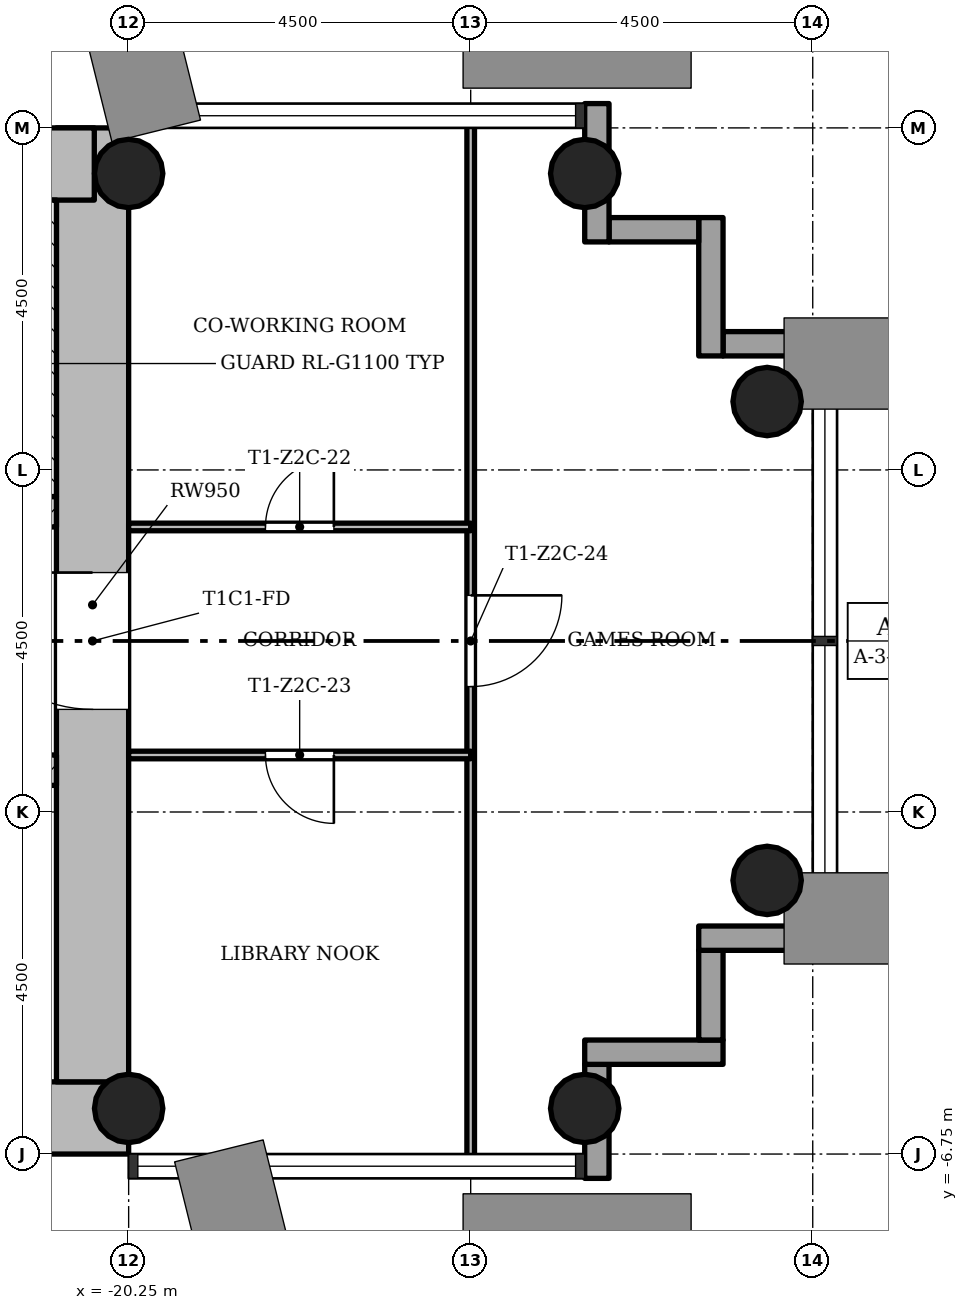
"""IFC4 building model, lengths in metres.
Left out: names, types, materials, properties, quantities, classifications, styles, units other than length and angle.
Written with IfcOpenShell. Run it as: python <this file> out.ifc"""

import sys

from ifc_helpers import new_model, si_unit, direction, frame, frame_2d, origin, origin_2d, place, context, subcontext, project, spatial, rectangle, hollow_circle, extrude, element, fill, save


model = new_model("IFC4")
c1 = context("Model", 3, precision=1e-05, world=origin(), true_north=direction((0.0, 1.0)))
c2 = subcontext(c1, "Body", "Model", "MODEL_VIEW")
j1 = project(units=[si_unit("LENGTHUNIT", "METRE"), si_unit("PLANEANGLEUNIT", "RADIAN")], contexts=[c1])
p1 = place(None, origin())
s1 = spatial("IfcSite", under=j1, at=p1, CompositionType="ELEMENT")
p2 = place(p1, origin())
s2 = spatial("IfcBuilding", under=s1, at=p2, CompositionType="ELEMENT")
p3 = place(p2, frame((0.0, 0.0, 93.6)))
s3 = spatial("IfcBuildingStorey", under=s2, at=p3, CompositionType="ELEMENT", Elevation=93.6)
p4 = place(p3, frame((-28.3, -6.275, 0.0), z_axis=(0.0, 0.0, 1.0), x_axis=(1.0, 0.0, 0.0)))
e1 = element("IfcWall", 1, at=p4, inside=s3, PredefinedType="SHEAR", context=c2, shape_type="SweptSolid", body=[
    extrude(rectangle(XDim=8.05, YDim=0.95, at=frame_2d((4.025, 0.0))), origin(), (0.0, 0.0, 1.0), 3.4),
])
p5 = place(p3, frame((-20.725, -5.8, 0.0), z_axis=(0.0, 0.0, 1.0), x_axis=(0.0, 1.0, 0.0)))
e2 = element("IfcWall", 2, at=p5, inside=s3, PredefinedType="SHEAR", context=c2, shape_type="SweptSolid", body=[
    extrude(rectangle(XDim=12.55, YDim=0.95, at=frame_2d((6.275, 0.0))), origin(), (0.0, 0.0, 1.0), 3.4),
])
p6 = place(p5, frame((4.9, 0.0, 0.0)))
e3 = element("IfcOpeningElement", 3, at=p6, cuts=e2, PredefinedType="OPENING", context=c2, shape_type="SweptSolid", body=[
    extrude(rectangle(XDim=1.8, YDim=2.1, at=frame_2d((0.9, 1.05))), frame((0.0, 0.485, 0.0), z_axis=(0.0, -1.0, 0.0), x_axis=(1.0, 0.0, 0.0)), (0.0, 0.0, 1.0), 0.97),
])
p7 = place(p3, frame((-20.702, 6.275, 0.0), z_axis=(0.0, 0.0, 1.0), x_axis=(-1.0, 0.0, 0.0)))
e4 = element("IfcWall", 4, at=p7, inside=s3, PredefinedType="SHEAR", context=c2, shape_type="SweptSolid", body=[
    extrude(rectangle(XDim=8.696, YDim=0.95, at=frame_2d((4.348, 0.0))), origin(), (0.0, 0.0, 1.0), 3.4),
])
p8 = place(p3, frame((-28.3, -1.7, 0.0), z_axis=(0.0, 0.0, 1.0), x_axis=(1.0, 0.0, 0.0)))
e5 = element("IfcWall", 5, at=p8, inside=s3, PredefinedType="SHEAR", context=c2, shape_type="SweptSolid", body=[
    extrude(rectangle(XDim=7.1, YDim=0.4, at=frame_2d((3.55, 0.0))), origin(), (0.0, 0.0, 1.0), 3.4),
])
p9 = place(p8, frame((0.8, 0.0, 0.0)))
e6 = element("IfcOpeningElement", 6, at=p9, cuts=e5, PredefinedType="OPENING", context=c2, shape_type="SweptSolid", body=[
    extrude(rectangle(XDim=1.1, YDim=2.1, at=frame_2d((0.55, 1.05))), frame((0.0, 0.21, 0.0), z_axis=(0.0, -1.0, 0.0), x_axis=(1.0, 0.0, 0.0)), (0.0, 0.0, 1.0), 0.42),
])
p10 = place(p8, frame((3.0, 0.0, 0.0)))
e7 = element("IfcOpeningElement", 7, at=p10, cuts=e5, PredefinedType="OPENING", context=c2, shape_type="SweptSolid", body=[
    extrude(rectangle(XDim=1.1, YDim=2.1, at=frame_2d((0.55, 1.05))), frame((0.0, 0.21, 0.0), z_axis=(0.0, -1.0, 0.0), x_axis=(1.0, 0.0, 0.0)), (0.0, 0.0, 1.0), 0.42),
])
p11 = place(p8, frame((5.2, 0.0, 0.0)))
e8 = element("IfcOpeningElement", 8, at=p11, cuts=e5, PredefinedType="OPENING", context=c2, shape_type="SweptSolid", body=[
    extrude(rectangle(XDim=1.1, YDim=2.1, at=frame_2d((0.55, 1.05))), frame((0.0, 0.21, 0.0), z_axis=(0.0, -1.0, 0.0), x_axis=(1.0, 0.0, 0.0)), (0.0, 0.0, 1.0), 0.42),
])
p12 = place(p3, frame((-28.3, 1.7, 0.0), z_axis=(0.0, 0.0, 1.0), x_axis=(1.0, 0.0, 0.0)))
e9 = element("IfcWall", 9, at=p12, inside=s3, PredefinedType="SHEAR", context=c2, shape_type="SweptSolid", body=[
    extrude(rectangle(XDim=7.1, YDim=0.4, at=frame_2d((3.55, 0.0))), origin(), (0.0, 0.0, 1.0), 3.4),
])
p13 = place(p12, frame((0.7, 0.0, 0.0)))
e10 = element("IfcOpeningElement", 10, at=p13, cuts=e9, PredefinedType="OPENING", context=c2, shape_type="SweptSolid", body=[
    extrude(rectangle(XDim=0.9, YDim=2.1, at=frame_2d((0.45, 1.05))), frame((0.0, 0.21, 0.0), z_axis=(0.0, -1.0, 0.0), x_axis=(1.0, 0.0, 0.0)), (0.0, 0.0, 1.0), 0.42),
])
for number, where, z_axis, x_axis in (
    (11, (-20.25, -6.15, 0.0), (0.0, 0.0, 1.0), (1.0, 0.0, 0.0)),
    (12, (-20.25, 6.15, 0.0), (0.0, 0.0, 1.0), (1.0, 0.0, 0.0)),
    (13, (-14.25, -6.15, 0.0), (0.0, 0.0, 1.0), (1.0, 0.0, 0.0)),
    (14, (-14.25, 6.15, 0.0), (0.0, 0.0, 1.0), (1.0, 0.0, 0.0)),
    (15, (-11.85, -3.15, 0.0), (0.0, 0.0, 1.0), (1.0, 0.0, 0.0)),
    (16, (-11.85, 3.15, 0.0), (0.0, 0.0, 1.0), (1.0, 0.0, 0.0)),
):
    element("IfcColumn", number, at=place(p3, frame(where, z_axis=z_axis, x_axis=x_axis)), inside=s3, PredefinedType="COLUMN", context=c2, shape_type="SweptSolid", body=[
        extrude(hollow_circle(Radius=0.45, WallThickness=0.032, at=origin_2d()), origin(), (0.0, 0.0, 1.0), 3.4),
    ])
p14 = place(p3, frame((-14.09, -7.07, -0.3), z_axis=(0.0, 0.0, 1.0), x_axis=(0.0, 1.0, 0.0)))
e17 = element("IfcWall", 17, at=p14, inside=s3, PredefinedType="STANDARD", context=c2, shape_type="SweptSolid", body=[
    extrude(rectangle(XDim=1.5, YDim=0.32, at=frame_2d((0.75, 0.0))), origin(), (0.0, 0.0, 1.0), 3.4),
])
p15 = place(p3, frame((-14.25, -5.41, -0.3), z_axis=(0.0, 0.0, 1.0), x_axis=(1.0, 0.0, 0.0)))
e18 = element("IfcWall", 18, at=p15, inside=s3, PredefinedType="STANDARD", context=c2, shape_type="SweptSolid", body=[
    extrude(rectangle(XDim=1.82, YDim=0.32, at=frame_2d((0.91, 0.0))), origin(), (0.0, 0.0, 1.0), 3.4),
])
p16 = place(p3, frame((-12.59, -5.25, -0.3), z_axis=(0.0, 0.0, 1.0), x_axis=(0.0, 1.0, 0.0)))
e19 = element("IfcWall", 19, at=p16, inside=s3, PredefinedType="STANDARD", context=c2, shape_type="SweptSolid", body=[
    extrude(rectangle(XDim=1.18, YDim=0.32, at=frame_2d((0.59, 0.0))), origin(), (0.0, 0.0, 1.0), 3.4),
])
p17 = place(p3, frame((-12.75, -3.91, -0.3), z_axis=(0.0, 0.0, 1.0), x_axis=(1.0, 0.0, 0.0)))
e20 = element("IfcWall", 20, at=p17, inside=s3, PredefinedType="STANDARD", context=c2, shape_type="SweptSolid", body=[
    extrude(rectangle(XDim=1.82, YDim=0.32, at=frame_2d((0.91, 0.0))), origin(), (0.0, 0.0, 1.0), 3.4),
])
p18 = place(p3, frame((-10.93, 3.91, -0.3), z_axis=(0.0, 0.0, 1.0), x_axis=(-1.0, 0.0, 0.0)))
e21 = element("IfcWall", 21, at=p18, inside=s3, PredefinedType="STANDARD", context=c2, shape_type="SweptSolid", body=[
    extrude(rectangle(XDim=1.5, YDim=0.32, at=frame_2d((0.75, 0.0))), origin(), (0.0, 0.0, 1.0), 3.4),
])
p19 = place(p3, frame((-12.59, 3.75, -0.3), z_axis=(0.0, 0.0, 1.0), x_axis=(0.0, 1.0, 0.0)))
e22 = element("IfcWall", 22, at=p19, inside=s3, PredefinedType="STANDARD", context=c2, shape_type="SweptSolid", body=[
    extrude(rectangle(XDim=1.82, YDim=0.32, at=frame_2d((0.91, 0.0))), origin(), (0.0, 0.0, 1.0), 3.4),
])
p20 = place(p3, frame((-12.75, 5.41, -0.3), z_axis=(0.0, 0.0, 1.0), x_axis=(-1.0, 0.0, 0.0)))
e23 = element("IfcWall", 23, at=p20, inside=s3, PredefinedType="STANDARD", context=c2, shape_type="SweptSolid", body=[
    extrude(rectangle(XDim=1.18, YDim=0.32, at=frame_2d((0.59, 0.0))), origin(), (0.0, 0.0, 1.0), 3.4),
])
p21 = place(p3, frame((-14.09, 5.25, -0.3), z_axis=(0.0, 0.0, 1.0), x_axis=(0.0, 1.0, 0.0)))
e24 = element("IfcWall", 24, at=p21, inside=s3, PredefinedType="STANDARD", context=c2, shape_type="SweptSolid", body=[
    extrude(rectangle(XDim=1.82, YDim=0.32, at=frame_2d((0.91, 0.0))), origin(), (0.0, 0.0, 1.0), 3.4),
])
p22 = place(p3, frame((-15.75, -6.85, 0.0), z_axis=(0.0, 0.0, 1.0), x_axis=(0.0, 1.0, 0.0)))
e25 = element("IfcWall", 25, at=p22, inside=s3, PredefinedType="PARTITIONING", context=c2, shape_type="SweptSolid", body=[
    extrude(rectangle(XDim=13.7, YDim=0.1, at=frame_2d((6.85, 0.0))), origin(), (0.0, 0.0, 1.0), 3.0),
])
p23 = place(p22, frame((6.25, 0.0, 0.0)))
e26 = element("IfcOpeningElement", 26, at=p23, cuts=e25, PredefinedType="OPENING", context=c2, shape_type="SweptSolid", body=[
    extrude(rectangle(XDim=1.2, YDim=2.1, at=frame_2d((0.6, 1.05))), frame((0.0, 0.06, 0.0), z_axis=(0.0, -1.0, 0.0), x_axis=(1.0, 0.0, 0.0)), (0.0, 0.0, 1.0), 0.12),
])
p24 = place(p3, frame((-20.25, -1.5, 0.0), z_axis=(0.0, 0.0, 1.0), x_axis=(1.0, 0.0, 0.0)))
e27 = element("IfcWall", 27, at=p24, inside=s3, PredefinedType="PARTITIONING", context=c2, shape_type="SweptSolid", body=[
    extrude(rectangle(XDim=4.5, YDim=0.1, at=frame_2d((2.25, 0.0))), origin(), (0.0, 0.0, 1.0), 3.0),
])
p25 = place(p24, frame((1.8, 0.0, 0.0)))
e28 = element("IfcOpeningElement", 28, at=p25, cuts=e27, PredefinedType="OPENING", context=c2, shape_type="SweptSolid", body=[
    extrude(rectangle(XDim=0.9, YDim=2.1, at=frame_2d((0.45, 1.05))), frame((0.0, 0.06, 0.0), z_axis=(0.0, -1.0, 0.0), x_axis=(1.0, 0.0, 0.0)), (0.0, 0.0, 1.0), 0.12),
])
p26 = place(p3, frame((-20.25, 1.5, 0.0), z_axis=(0.0, 0.0, 1.0), x_axis=(1.0, 0.0, 0.0)))
e29 = element("IfcWall", 29, at=p26, inside=s3, PredefinedType="PARTITIONING", context=c2, shape_type="SweptSolid", body=[
    extrude(rectangle(XDim=4.5, YDim=0.1, at=frame_2d((2.25, 0.0))), origin(), (0.0, 0.0, 1.0), 3.0),
])
p27 = place(p26, frame((1.8, 0.0, 0.0)))
e30 = element("IfcOpeningElement", 30, at=p27, cuts=e29, PredefinedType="OPENING", context=c2, shape_type="SweptSolid", body=[
    extrude(rectangle(XDim=0.9, YDim=2.1, at=frame_2d((0.45, 1.05))), frame((0.0, 0.06, 0.0), z_axis=(0.0, -1.0, 0.0), x_axis=(1.0, 0.0, 0.0)), (0.0, 0.0, 1.0), 0.12),
])
p28 = place(p3, frame((-21.325, 1.9, 0.0), z_axis=(0.0, 0.0, 1.0), x_axis=(0.0, 1.0, 0.0)))
e31 = element("IfcWall", 31, at=p28, inside=s3, PredefinedType="SHEAR", context=c2, shape_type="SweptSolid", body=[
    extrude(rectangle(XDim=3.9, YDim=0.25, at=frame_2d((1.95, 0.0))), origin(), (0.0, 0.0, 1.0), 3.4),
])
p29 = place(p27, origin())
e32 = element("IfcDoor", 32, at=p29, inside=s3, OperationType="SINGLE_SWING_LEFT", PredefinedType="DOOR", context=c2, shape_type="SweptSolid", body=[
    extrude(rectangle(XDim=0.9, YDim=2.1, at=frame_2d((0.45, 1.05))), frame((0.0, 0.025, 0.0), z_axis=(0.0, -1.0, 0.0), x_axis=(1.0, 0.0, 0.0)), (0.0, 0.0, 1.0), 0.05),
])
fill(e30, e32)
p30 = place(p25, origin())
e33 = element("IfcDoor", 33, at=p30, inside=s3, OperationType="SINGLE_SWING_RIGHT", PredefinedType="DOOR", context=c2, shape_type="SweptSolid", body=[
    extrude(rectangle(XDim=0.9, YDim=2.1, at=frame_2d((0.45, 1.05))), frame((0.0, 0.025, 0.0), z_axis=(0.0, -1.0, 0.0), x_axis=(1.0, 0.0, 0.0)), (0.0, 0.0, 1.0), 0.05),
])
fill(e28, e33)
p31 = place(p23, origin())
e34 = element("IfcDoor", 34, at=p31, inside=s3, OperationType="SINGLE_SWING_RIGHT", PredefinedType="DOOR", context=c2, shape_type="SweptSolid", body=[
    extrude(rectangle(XDim=1.2, YDim=2.1, at=frame_2d((0.6, 1.05))), frame((0.0, 0.025, 0.0), z_axis=(0.0, -1.0, 0.0), x_axis=(1.0, 0.0, 0.0)), (0.0, 0.0, 1.0), 0.05),
])
fill(e26, e34)
p32 = place(p6, origin())
e35 = element("IfcDoor", 35, at=p32, inside=s3, OperationType="SINGLE_SWING_LEFT", PredefinedType="DOOR", context=c2, shape_type="SweptSolid", body=[
    extrude(rectangle(XDim=1.8, YDim=2.1, at=frame_2d((0.9, 1.05))), frame((0.0, 0.025, 0.0), z_axis=(0.0, -1.0, 0.0), x_axis=(1.0, 0.0, 0.0)), (0.0, 0.0, 1.0), 0.05),
])
fill(e3, e35)
save(model, sys.argv[1])
